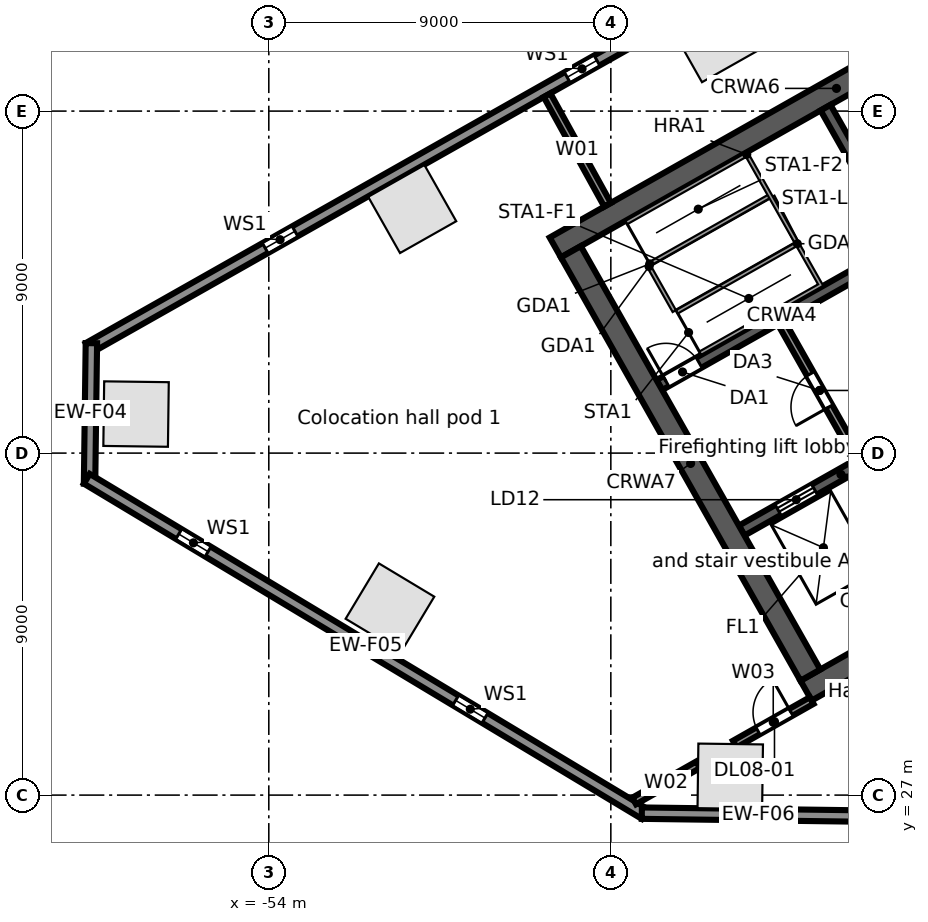
"""IFC4 building model, lengths in metres.
Left out: names, types, materials, properties, quantities, classifications, styles, units other than length and angle.
Written with IfcOpenShell. Run it as: python <this file> out.ifc"""

import sys

from ifc_helpers import new_model, si_unit, direction, frame, frame_2d, origin, origin_2d, place, context, subcontext, project, spatial, rectangle, extrude, element, fill, save


model = new_model("IFC4")
c1 = context("Model", 3, precision=1e-05, world=origin(), true_north=direction((0.0, 1.0)))
c2 = subcontext(c1, "Body", "Model", "MODEL_VIEW")
j1 = project(units=[si_unit("LENGTHUNIT", "METRE"), si_unit("PLANEANGLEUNIT", "RADIAN")], contexts=[c1])
p1 = place(None, origin())
s1 = spatial("IfcSite", under=j1, at=p1, CompositionType="ELEMENT")
p2 = place(p1, origin())
s2 = spatial("IfcBuilding", under=s1, at=p2, CompositionType="ELEMENT")
p3 = place(p2, frame((0.0, 0.0, 41.5)))
s3 = spatial("IfcBuildingStorey", under=s2, at=p3, CompositionType="ELEMENT", Elevation=41.5)
for number, where, z_axis, x_axis in (
    (1, (-42.28, 46.919, 0.0), (0.0, 0.0, 1.0), (-0.87, -0.492, 0.0)),
    (2, (-50.226, 42.423, 0.0), (0.0, 0.0, 1.0), (-0.87, -0.492, 0.0)),
    (3, (-57.493, 37.027, 0.0), (0.0, 0.0, 1.0), (-0.013, -1.0, 0.0)),
    (4, (-50.812, 31.931, 0.0), (0.0, 0.0, 1.0), (0.857, -0.515, 0.0)),
    (5, (-41.858, 27.495, 0.0), (0.0, 0.0, 1.0), (1.0, -0.013, 0.0)),
):
    element("IfcColumn", number, at=place(p3, frame(where, z_axis=z_axis, x_axis=x_axis)), inside=s3, PredefinedType="COLUMN", context=c2, shape_type="SweptSolid", body=[
        extrude(rectangle(XDim=1.7, YDim=1.7, at=origin_2d()), origin(), (0.0, 0.0, 1.0), 5.0),
    ])
p4 = place(p3, frame((-58.745, 38.764, 0.0), z_axis=(0.0, 0.0, 1.0), x_axis=(0.870355811726, 0.492423355453, 0.0)))
e6 = element("IfcWall", 6, at=p4, inside=s3, PredefinedType="STANDARD", context=c2, shape_type="SweptSolid", body=[
    extrude(rectangle(XDim=64.025, YDim=0.3, at=frame_2d((32.013, 0.0))), origin(), (0.0, 0.0, 1.0), 4.68),
])
p5 = place(p4, frame((60.122, 0.0, 0.6)))
e7 = element("IfcOpeningElement", 7, at=p5, cuts=e6, PredefinedType="OPENING", context=c2, shape_type="SweptSolid", body=[
    extrude(rectangle(XDim=0.9, YDim=3.2, at=frame_2d((0.45, 1.6))), frame((0.0, 0.16, 0.0), z_axis=(0.0, -1.0, 0.0), x_axis=(1.0, 0.0, 0.0)), (0.0, 0.0, 1.0), 0.32),
])
p6 = place(p4, frame((50.992, 0.0, 0.6)))
e8 = element("IfcOpeningElement", 8, at=p6, cuts=e6, PredefinedType="OPENING", context=c2, shape_type="SweptSolid", body=[
    extrude(rectangle(XDim=0.9, YDim=3.2, at=frame_2d((0.45, 1.6))), frame((0.0, 0.16, 0.0), z_axis=(0.0, -1.0, 0.0), x_axis=(1.0, 0.0, 0.0)), (0.0, 0.0, 1.0), 0.32),
])
p7 = place(p4, frame((41.862, 0.0, 0.6)))
e9 = element("IfcOpeningElement", 9, at=p7, cuts=e6, PredefinedType="OPENING", context=c2, shape_type="SweptSolid", body=[
    extrude(rectangle(XDim=0.9, YDim=3.2, at=frame_2d((0.45, 1.6))), frame((0.0, 0.16, 0.0), z_axis=(0.0, -1.0, 0.0), x_axis=(1.0, 0.0, 0.0)), (0.0, 0.0, 1.0), 0.32),
])
p8 = place(p4, frame((32.732, 0.0, 0.6)))
e10 = element("IfcOpeningElement", 10, at=p8, cuts=e6, PredefinedType="OPENING", context=c2, shape_type="SweptSolid", body=[
    extrude(rectangle(XDim=0.9, YDim=3.2, at=frame_2d((0.45, 1.6))), frame((0.0, 0.16, 0.0), z_axis=(0.0, -1.0, 0.0), x_axis=(1.0, 0.0, 0.0)), (0.0, 0.0, 1.0), 0.32),
])
p9 = place(p4, frame((23.602, 0.0, 0.6)))
e11 = element("IfcOpeningElement", 11, at=p9, cuts=e6, PredefinedType="OPENING", context=c2, shape_type="SweptSolid", body=[
    extrude(rectangle(XDim=0.9, YDim=3.2, at=frame_2d((0.45, 1.6))), frame((0.0, 0.16, 0.0), z_axis=(0.0, -1.0, 0.0), x_axis=(1.0, 0.0, 0.0)), (0.0, 0.0, 1.0), 0.32),
])
p10 = place(p4, frame((14.472, 0.0, 0.6)))
e12 = element("IfcOpeningElement", 12, at=p10, cuts=e6, PredefinedType="OPENING", context=c2, shape_type="SweptSolid", body=[
    extrude(rectangle(XDim=0.9, YDim=3.2, at=frame_2d((0.45, 1.6))), frame((0.0, 0.16, 0.0), z_axis=(0.0, -1.0, 0.0), x_axis=(1.0, 0.0, 0.0)), (0.0, 0.0, 1.0), 0.32),
])
p11 = place(p4, frame((5.342, 0.0, 0.6)))
e13 = element("IfcOpeningElement", 13, at=p11, cuts=e6, PredefinedType="OPENING", context=c2, shape_type="SweptSolid", body=[
    extrude(rectangle(XDim=0.9, YDim=3.2, at=frame_2d((0.45, 1.6))), frame((0.0, 0.16, 0.0), z_axis=(0.0, -1.0, 0.0), x_axis=(1.0, 0.0, 0.0)), (0.0, 0.0, 1.0), 0.32),
])
p12 = place(p3, frame((-58.717, 35.194, 0.0), z_axis=(0.0, 0.0, 1.0), x_axis=(0.013069053407, 0.999914596275, 0.0)))
e14 = element("IfcWall", 14, at=p12, inside=s3, PredefinedType="STANDARD", context=c2, shape_type="SweptSolid", body=[
    extrude(rectangle(XDim=3.699, YDim=0.3, at=frame_2d((1.849, 0.0))), origin(), (0.0, 0.0, 1.0), 4.68),
])
p13 = place(p3, frame((-44.109, 26.504, 0.0), z_axis=(0.0, 0.0, 1.0), x_axis=(-0.857169502585, 0.515034410344, 0.0)))
e15 = element("IfcWall", 15, at=p13, inside=s3, PredefinedType="STANDARD", context=c2, shape_type="SweptSolid", body=[
    extrude(rectangle(XDim=17.127, YDim=0.3, at=frame_2d((8.563, 0.0))), origin(), (0.0, 0.0, 1.0), 4.68),
])
p14 = place(p13, frame((13.403, 0.0, 0.6)))
e16 = element("IfcOpeningElement", 16, at=p14, cuts=e15, PredefinedType="OPENING", context=c2, shape_type="SweptSolid", body=[
    extrude(rectangle(XDim=0.9, YDim=3.2, at=frame_2d((0.45, 1.6))), frame((0.0, 0.16, 0.0), z_axis=(0.0, -1.0, 0.0), x_axis=(1.0, 0.0, 0.0)), (0.0, 0.0, 1.0), 0.32),
])
p15 = place(p13, frame((4.903, 0.0, 0.6)))
e17 = element("IfcOpeningElement", 17, at=p15, cuts=e15, PredefinedType="OPENING", context=c2, shape_type="SweptSolid", body=[
    extrude(rectangle(XDim=0.9, YDim=3.2, at=frame_2d((0.45, 1.6))), frame((0.0, 0.16, 0.0), z_axis=(0.0, -1.0, 0.0), x_axis=(1.0, 0.0, 0.0)), (0.0, 0.0, 1.0), 0.32),
])
p16 = place(p3, frame((-38.057, 26.445, 0.0), z_axis=(0.0, 0.0, 1.0), x_axis=(-0.999914086342, 0.013108010296, 0.0)))
e18 = element("IfcWall", 18, at=p16, inside=s3, PredefinedType="STANDARD", context=c2, shape_type="SweptSolid", body=[
    extrude(rectangle(XDim=6.128, YDim=0.3, at=frame_2d((3.064, 0.0))), origin(), (0.0, 0.0, 1.0), 4.68),
])
p17 = place(p3, frame((-39.862, 29.749, 0.0), z_axis=(0.0, 0.0, 1.0), x_axis=(0.870350116061, 0.492433422375, 0.0)))
e19 = element("IfcWall", 19, at=p17, inside=s3, PredefinedType="SOLIDWALL", context=c2, shape_type="SweptSolid", body=[
    extrude(rectangle(XDim=17.0, YDim=0.6, at=frame_2d((8.5, 0.0))), origin(), (0.0, 0.0, 1.0), 4.68),
])
p18 = place(p17, frame((7.2, 0.0, 0.0)))
e20 = element("IfcOpeningElement", 20, at=p18, cuts=e19, PredefinedType="OPENING", context=c2, shape_type="SweptSolid", body=[
    extrude(rectangle(XDim=1.2, YDim=2.1, at=frame_2d((0.6, 1.05))), frame((0.0, 0.31, 0.0), z_axis=(0.0, -1.0, 0.0), x_axis=(1.0, 0.0, 0.0)), (0.0, 0.0, 1.0), 0.62),
])
p19 = place(p3, frame((-41.556, 33.961, 0.0), z_axis=(0.0, 0.0, 1.0), x_axis=(0.870343731308, 0.492444706919, 0.0)))
e21 = element("IfcWall", 21, at=p19, inside=s3, PredefinedType="SOLIDWALL", context=c2, shape_type="SweptSolid", body=[
    extrude(rectangle(XDim=6.0, YDim=0.3, at=frame_2d((3.0, 0.0))), origin(), (0.0, 0.0, 1.0), 4.68),
])
p20 = place(p19, frame((1.1, 0.0, 0.0)))
e22 = element("IfcOpeningElement", 22, at=p20, cuts=e21, PredefinedType="OPENING", context=c2, shape_type="SweptSolid", body=[
    extrude(rectangle(XDim=1.1, YDim=2.1, at=frame_2d((0.55, 1.05))), frame((0.0, 0.16, 0.0), z_axis=(0.0, -1.0, 0.0), x_axis=(1.0, 0.0, 0.0)), (0.0, 0.0, 1.0), 0.32),
])
p21 = place(p19, frame((4.25, 0.0, 0.0)))
e23 = element("IfcOpeningElement", 23, at=p21, cuts=e21, PredefinedType="OPENING", context=c2, shape_type="SweptSolid", body=[
    extrude(rectangle(XDim=1.1, YDim=2.1, at=frame_2d((0.55, 1.05))), frame((0.0, 0.16, 0.0), z_axis=(0.0, -1.0, 0.0), x_axis=(1.0, 0.0, 0.0)), (0.0, 0.0, 1.0), 0.32),
])
p22 = place(p3, frame((-43.723, 37.791, 0.0), z_axis=(0.0, 0.0, 1.0), x_axis=(0.87035077051, 0.49243226567, 0.0)))
e24 = element("IfcWall", 24, at=p22, inside=s3, PredefinedType="SOLIDWALL", context=c2, shape_type="SweptSolid", body=[
    extrude(rectangle(XDim=7.4, YDim=0.3, at=frame_2d((3.7, 0.0))), origin(), (0.0, 0.0, 1.0), 4.68),
])
p23 = place(p22, frame((0.2, 0.0, 0.0)))
e25 = element("IfcOpeningElement", 25, at=p23, cuts=e24, PredefinedType="OPENING", context=c2, shape_type="SweptSolid", body=[
    extrude(rectangle(XDim=1.0, YDim=2.1, at=frame_2d((0.5, 1.05))), frame((0.0, 0.16, 0.0), z_axis=(0.0, -1.0, 0.0), x_axis=(1.0, 0.0, 0.0)), (0.0, 0.0, 1.0), 0.32),
])
p24 = place(p3, frame((-46.461, 41.412, 0.0), z_axis=(0.0, 0.0, 1.0), x_axis=(0.870350116061, 0.492433422375, 0.0)))
e26 = element("IfcWall", 26, at=p24, inside=s3, PredefinedType="SOLIDWALL", context=c2, shape_type="SweptSolid", body=[
    extrude(rectangle(XDim=17.0, YDim=0.6, at=frame_2d((8.5, 0.0))), origin(), (0.0, 0.0, 1.0), 4.68),
])
p25 = place(p3, frame((-46.052, 41.298, 0.0), z_axis=(0.0, 0.0, 1.0), x_axis=(0.492418598281, -0.870358503186, 0.0)))
e27 = element("IfcWall", 27, at=p25, inside=s3, PredefinedType="SOLIDWALL", context=c2, shape_type="SweptSolid", body=[
    extrude(rectangle(XDim=12.8, YDim=0.6, at=frame_2d((6.4, 0.0))), origin(), (0.0, 0.0, 1.0), 4.68),
])
p26 = place(p3, frame((-40.516, 39.433, 0.0), z_axis=(0.0, 0.0, 1.0), x_axis=(0.492453559952, -0.87033872216, 0.0)))
e28 = element("IfcWall", 28, at=p26, inside=s3, PredefinedType="PARTITIONING", context=c2, shape_type="SweptSolid", body=[
    extrude(rectangle(XDim=4.1, YDim=0.2, at=frame_2d((2.05, 0.0))), origin(), (0.0, 0.0, 1.0), 4.68),
])
p27 = place(p26, frame((1.55, 0.0, 0.0)))
e29 = element("IfcOpeningElement", 29, at=p27, cuts=e28, PredefinedType="OPENING", context=c2, shape_type="SweptSolid", body=[
    extrude(rectangle(XDim=1.0, YDim=2.1, at=frame_2d((0.5, 1.05))), frame((0.0, 0.11, 0.0), z_axis=(0.0, -1.0, 0.0), x_axis=(1.0, 0.0, 0.0)), (0.0, 0.0, 1.0), 0.22),
])
p28 = place(p3, frame((-39.35, 45.09, 0.0), z_axis=(0.0, 0.0, 1.0), x_axis=(0.49241474071, -0.870360685654, 0.0)))
e30 = element("IfcWall", 30, at=p28, inside=s3, PredefinedType="SOLIDWALL", context=c2, shape_type="SweptSolid", body=[
    extrude(rectangle(XDim=4.05, YDim=0.3, at=frame_2d((2.025, 0.0))), origin(), (0.0, 0.0, 1.0), 4.68),
])
p29 = place(p3, frame((-46.678, 45.419, 0.0), z_axis=(0.0, 0.0, 1.0), x_axis=(0.483275206546, -0.875468488718, 0.0)))
e31 = element("IfcWall", 31, at=p29, inside=s3, PredefinedType="PARTITIONING", context=c2, shape_type="SweptSolid", body=[
    extrude(rectangle(XDim=3.294, YDim=0.2, at=frame_2d((1.647, 0.0))), origin(), (0.0, 0.0, 1.0), 3.96),
])
p30 = place(p3, frame((-44.386, 26.845, 0.0), z_axis=(0.0, 0.0, 1.0), x_axis=(0.870226201187, 0.492652371118, 0.0)))
e32 = element("IfcWall", 32, at=p30, inside=s3, PredefinedType="PARTITIONING", context=c2, shape_type="SweptSolid", body=[
    extrude(rectangle(XDim=1.933, YDim=0.2, at=frame_2d((0.966, 0.0))), origin(), (0.0, 0.0, 1.0), 4.68),
])
p31 = place(p3, frame((-41.738, 28.343, 0.0), z_axis=(0.0, 0.0, 1.0), x_axis=(0.870265350095, 0.492583211676, 0.0)))
e33 = element("IfcWall", 33, at=p31, inside=s3, PredefinedType="PARTITIONING", context=c2, shape_type="SweptSolid", body=[
    extrude(rectangle(XDim=2.324, YDim=0.2, at=frame_2d((1.162, 0.0))), origin(), (0.0, 0.0, 1.0), 4.68),
])
p32 = place(p31, frame((0.7, 0.0, 0.0)))
e34 = element("IfcOpeningElement", 34, at=p32, cuts=e33, PredefinedType="OPENING", context=c2, shape_type="SweptSolid", body=[
    extrude(rectangle(XDim=1.0, YDim=2.1, at=frame_2d((0.5, 1.05))), frame((0.0, 0.11, 0.0), z_axis=(0.0, -1.0, 0.0), x_axis=(1.0, 0.0, 0.0)), (0.0, 0.0, 1.0), 0.22),
])
p33 = place(p10, origin())
e35 = element("IfcWindow", 35, at=p33, inside=s3, PartitioningType="SINGLE_PANEL", PredefinedType="WINDOW", context=c2, shape_type="SweptSolid", body=[
    extrude(rectangle(XDim=0.9, YDim=3.2, at=frame_2d((0.45, 1.6))), frame((0.0, 0.03, 0.0), z_axis=(0.0, -1.0, 0.0), x_axis=(1.0, 0.0, 0.0)), (0.0, 0.0, 1.0), 0.06),
])
fill(e12, e35)
p34 = place(p11, origin())
e36 = element("IfcWindow", 36, at=p34, inside=s3, PartitioningType="SINGLE_PANEL", PredefinedType="WINDOW", context=c2, shape_type="SweptSolid", body=[
    extrude(rectangle(XDim=0.9, YDim=3.2, at=frame_2d((0.45, 1.6))), frame((0.0, 0.03, 0.0), z_axis=(0.0, -1.0, 0.0), x_axis=(1.0, 0.0, 0.0)), (0.0, 0.0, 1.0), 0.06),
])
fill(e13, e36)
p35 = place(p14, origin())
e37 = element("IfcWindow", 37, at=p35, inside=s3, PartitioningType="SINGLE_PANEL", PredefinedType="WINDOW", context=c2, shape_type="SweptSolid", body=[
    extrude(rectangle(XDim=0.9, YDim=3.2, at=frame_2d((0.45, 1.6))), frame((0.0, 0.03, 0.0), z_axis=(0.0, -1.0, 0.0), x_axis=(1.0, 0.0, 0.0)), (0.0, 0.0, 1.0), 0.06),
])
fill(e16, e37)
p36 = place(p15, origin())
e38 = element("IfcWindow", 38, at=p36, inside=s3, PartitioningType="SINGLE_PANEL", PredefinedType="WINDOW", context=c2, shape_type="SweptSolid", body=[
    extrude(rectangle(XDim=0.9, YDim=3.2, at=frame_2d((0.45, 1.6))), frame((0.0, 0.03, 0.0), z_axis=(0.0, -1.0, 0.0), x_axis=(1.0, 0.0, 0.0)), (0.0, 0.0, 1.0), 0.06),
])
fill(e17, e38)
p37 = place(p20, origin())
e39 = element("IfcDoor", 39, at=p37, inside=s3, OperationType="DOUBLE_DOOR_SLIDING", PredefinedType="DOOR", context=c2, shape_type="SweptSolid", body=[
    extrude(rectangle(XDim=1.1, YDim=2.1, at=frame_2d((0.55, 1.05))), frame((0.0, 0.025, 0.0), z_axis=(0.0, -1.0, 0.0), x_axis=(1.0, 0.0, 0.0)), (0.0, 0.0, 1.0), 0.05),
])
fill(e22, e39)
p38 = place(p23, origin())
e40 = element("IfcDoor", 40, at=p38, inside=s3, OperationType="SINGLE_SWING_LEFT", PredefinedType="DOOR", context=c2, shape_type="SweptSolid", body=[
    extrude(rectangle(XDim=1.0, YDim=2.1, at=frame_2d((0.5, 1.05))), frame((0.0, 0.025, 0.0), z_axis=(0.0, -1.0, 0.0), x_axis=(1.0, 0.0, 0.0)), (0.0, 0.0, 1.0), 0.05),
])
fill(e25, e40)
p39 = place(p27, frame((1.0, 0.0, 0.0), z_axis=(0.0, 0.0, 1.0), x_axis=(-1.0, 0.0, 0.0)))
e41 = element("IfcDoor", 41, at=p39, inside=s3, OperationType="SINGLE_SWING_LEFT", PredefinedType="DOOR", context=c2, shape_type="SweptSolid", body=[
    extrude(rectangle(XDim=1.0, YDim=2.1, at=frame_2d((0.5, 1.05))), frame((0.0, 0.025, 0.0), z_axis=(0.0, -1.0, 0.0), x_axis=(1.0, 0.0, 0.0)), (0.0, 0.0, 1.0), 0.05),
])
fill(e29, e41)
p40 = place(p32, origin())
e42 = element("IfcDoor", 42, at=p40, inside=s3, OperationType="SINGLE_SWING_RIGHT", PredefinedType="DOOR", context=c2, shape_type="SweptSolid", body=[
    extrude(rectangle(XDim=1.0, YDim=2.1, at=frame_2d((0.5, 1.05))), frame((0.0, 0.025, 0.0), z_axis=(0.0, -1.0, 0.0), x_axis=(1.0, 0.0, 0.0)), (0.0, 0.0, 1.0), 0.05),
])
fill(e34, e42)
save(model, sys.argv[1])
